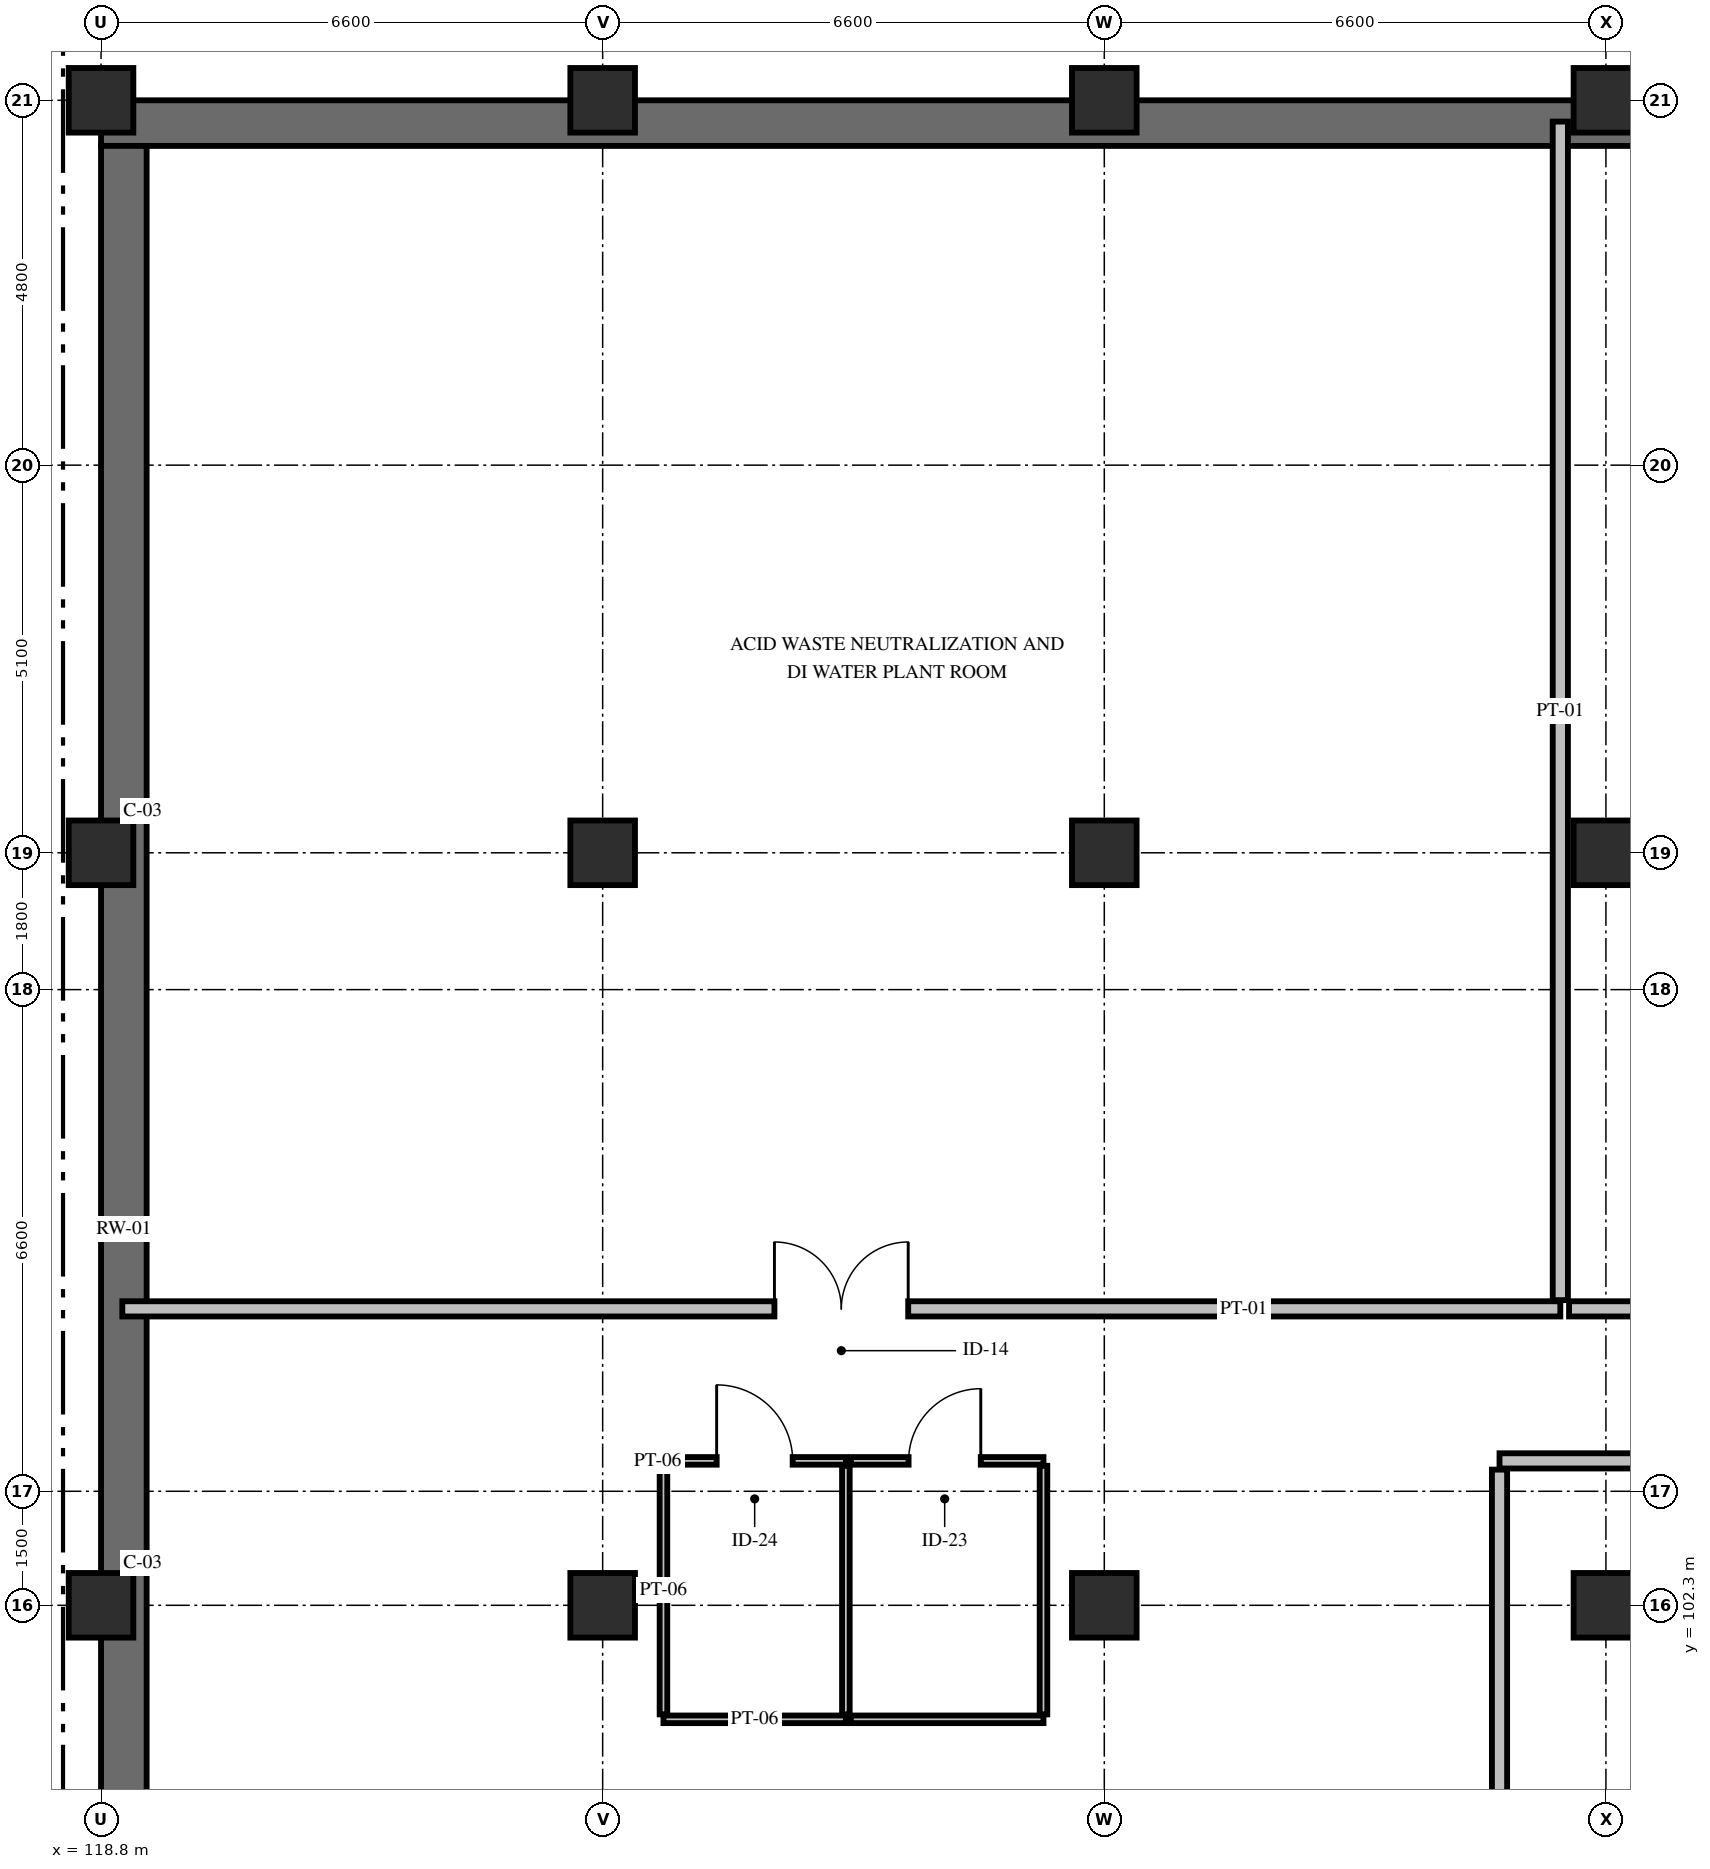
"""IFC4 building model, lengths in metres.
Left out: names, types, materials, properties, quantities, classifications, styles, units other than length and angle.
Written with IfcOpenShell. Run it as: python <this file> out.ifc"""

import sys

from ifc_helpers import new_model, si_unit, direction, frame, frame_2d, origin, origin_2d, place, context, subcontext, project, spatial, rectangle, extrude, element, fill, save


model = new_model("IFC4")
c1 = context("Model", 3, precision=1e-05, world=origin(), true_north=direction((0.0, 1.0)))
c2 = subcontext(c1, "Body", "Model", "MODEL_VIEW")
j1 = project(units=[si_unit("LENGTHUNIT", "METRE"), si_unit("PLANEANGLEUNIT", "RADIAN")], contexts=[c1])
p1 = place(None, origin())
s1 = spatial("IfcSite", under=j1, at=p1, CompositionType="ELEMENT")
p2 = place(p1, origin())
s2 = spatial("IfcBuilding", under=s1, at=p2, CompositionType="ELEMENT")
p3 = place(p2, frame((0.0, 0.0, -5.4)))
s3 = spatial("IfcBuildingStorey", under=s2, at=p3, CompositionType="ELEMENT", Elevation=-5.4)
p4 = place(p3, frame((118.8, 121.8, 0.0), z_axis=(0.0, 0.0, 1.0), x_axis=(1.0, 0.0, 0.0)))
e1 = element("IfcWall", 1, at=p4, inside=s3, PredefinedType="USERDEFINED", context=c2, shape_type="SweptSolid", body=[
    extrude(rectangle(XDim=59.4, YDim=0.6, at=frame_2d((29.7, 0.0))), origin(), (0.0, 0.0, 1.0), 4.96),
])
p5 = place(p3, frame((119.1, 93.0, 0.0), z_axis=(0.0, 0.0, 1.0), x_axis=(0.0, 1.0, 0.0)))
e2 = element("IfcWall", 2, at=p5, inside=s3, PredefinedType="USERDEFINED", context=c2, shape_type="SweptSolid", body=[
    extrude(rectangle(XDim=28.5, YDim=0.6, at=frame_2d((14.25, 0.0))), origin(), (0.0, 0.0, 1.0), 4.96),
])
for number, where, z_axis, x_axis in (
    (3, (118.8, 102.3, 0.0), (0.0, 0.0, 1.0), (1.0, 0.0, 0.0)),
    (4, (118.8, 112.2, 0.0), (0.0, 0.0, 1.0), (1.0, 0.0, 0.0)),
    (5, (118.8, 122.1, 0.0), (0.0, 0.0, 1.0), (1.0, 0.0, 0.0)),
    (6, (125.4, 102.3, 0.0), (0.0, 0.0, 1.0), (1.0, 0.0, 0.0)),
    (7, (125.4, 112.2, 0.0), (0.0, 0.0, 1.0), (1.0, 0.0, 0.0)),
    (8, (125.4, 122.1, 0.0), (0.0, 0.0, 1.0), (1.0, 0.0, 0.0)),
    (9, (132.0, 102.3, 0.0), (0.0, 0.0, 1.0), (1.0, 0.0, 0.0)),
    (10, (132.0, 112.2, 0.0), (0.0, 0.0, 1.0), (1.0, 0.0, 0.0)),
    (11, (132.0, 122.1, 0.0), (0.0, 0.0, 1.0), (1.0, 0.0, 0.0)),
    (12, (138.6, 102.3, 0.0), (0.0, 0.0, 1.0), (1.0, 0.0, 0.0)),
    (13, (138.6, 112.2, 0.0), (0.0, 0.0, 1.0), (1.0, 0.0, 0.0)),
    (14, (138.6, 122.1, 0.0), (0.0, 0.0, 1.0), (1.0, 0.0, 0.0)),
):
    element("IfcColumn", number, at=place(p3, frame(where, z_axis=z_axis, x_axis=x_axis)), inside=s3, PredefinedType="COLUMN", context=c2, shape_type="SweptSolid", body=[
        extrude(rectangle(XDim=0.85, YDim=0.85, at=origin_2d()), origin(), (0.0, 0.0, 1.0), 5.4),
    ])
p6 = place(p3, frame((126.2, 100.8, 0.0), z_axis=(0.0, 0.0, 1.0), x_axis=(1.0, 0.0, 0.0)))
e15 = element("IfcWall", 15, at=p6, inside=s3, PredefinedType="PARTITIONING", context=c2, shape_type="SweptSolid", body=[
    extrude(rectangle(XDim=2.4, YDim=0.1, at=frame_2d((1.2, 0.0))), origin(), (0.0, 0.0, 1.0), 4.94),
])
p7 = place(p3, frame((126.2, 104.2, 0.0), z_axis=(0.0, 0.0, 1.0), x_axis=(1.0, 0.0, 0.0)))
e16 = element("IfcWall", 16, at=p7, inside=s3, PredefinedType="PARTITIONING", context=c2, shape_type="SweptSolid", body=[
    extrude(rectangle(XDim=2.4, YDim=0.1, at=frame_2d((1.2, 0.0))), origin(), (0.0, 0.0, 1.0), 4.845),
])
p8 = place(p7, frame((0.7, 0.0, 0.0)))
e17 = element("IfcOpeningElement", 17, at=p8, cuts=e16, PredefinedType="OPENING", context=c2, shape_type="SweptSolid", body=[
    extrude(rectangle(XDim=1.0, YDim=2.15, at=frame_2d((0.5, 1.075))), frame((0.0, 0.065, 0.0), z_axis=(0.0, -1.0, 0.0), x_axis=(1.0, 0.0, 0.0)), (0.0, 0.0, 1.0), 0.13),
])
for number, where, z_axis, x_axis in (
    (18, (126.2, 100.865, 0.0), (0.0, 0.0, 1.0), (0.0, 1.0, 0.0)),
    (19, (128.6, 100.865, 0.0), (0.0, 0.0, 1.0), (0.0, 1.0, 0.0)),
):
    element("IfcWall", number, at=place(p3, frame(where, z_axis=z_axis, x_axis=x_axis)), inside=s3, PredefinedType="PARTITIONING", context=c2, shape_type="SweptSolid", body=[
        extrude(rectangle(XDim=3.27, YDim=0.1, at=frame_2d((1.635, 0.0))), origin(), (0.0, 0.0, 1.0), 4.665),
    ])
p9 = place(p3, frame((128.665, 100.8, 0.0), z_axis=(0.0, 0.0, 1.0), x_axis=(1.0, 0.0, 0.0)))
e20 = element("IfcWall", 20, at=p9, inside=s3, PredefinedType="PARTITIONING", context=c2, shape_type="SweptSolid", body=[
    extrude(rectangle(XDim=2.535, YDim=0.1, at=frame_2d((1.268, 0.0))), origin(), (0.0, 0.0, 1.0), 4.94),
])
p10 = place(p3, frame((128.665, 104.2, 0.0), z_axis=(0.0, 0.0, 1.0), x_axis=(1.0, 0.0, 0.0)))
e21 = element("IfcWall", 21, at=p10, inside=s3, PredefinedType="PARTITIONING", context=c2, shape_type="SweptSolid", body=[
    extrude(rectangle(XDim=2.535, YDim=0.1, at=frame_2d((1.268, 0.0))), origin(), (0.0, 0.0, 1.0), 4.845),
])
p11 = place(p10, frame((0.76, 0.0, 0.0)))
e22 = element("IfcOpeningElement", 22, at=p11, cuts=e21, PredefinedType="OPENING", context=c2, shape_type="SweptSolid", body=[
    extrude(rectangle(XDim=0.95, YDim=2.15, at=frame_2d((0.475, 1.075))), frame((0.0, 0.065, 0.0), z_axis=(0.0, -1.0, 0.0), x_axis=(1.0, 0.0, 0.0)), (0.0, 0.0, 1.0), 0.13),
])
p12 = place(p3, frame((131.2, 100.865, 0.0), z_axis=(0.0, 0.0, 1.0), x_axis=(0.0, 1.0, 0.0)))
e23 = element("IfcWall", 23, at=p12, inside=s3, PredefinedType="PARTITIONING", context=c2, shape_type="SweptSolid", body=[
    extrude(rectangle(XDim=3.27, YDim=0.1, at=frame_2d((1.635, 0.0))), origin(), (0.0, 0.0, 1.0), 4.665),
])
p13 = place(p3, frame((119.08, 106.2, 0.0), z_axis=(0.0, 0.0, 1.0), x_axis=(1.0, 0.0, 0.0)))
e24 = element("IfcWall", 24, at=p13, inside=s3, PredefinedType="PARTITIONING", context=c2, shape_type="SweptSolid", body=[
    extrude(rectangle(XDim=18.92, YDim=0.2, at=frame_2d((9.46, 0.0))), origin(), (0.0, 0.0, 1.0), 4.38),
])
p14 = place(p13, frame((8.58, 0.0, 0.0)))
e25 = element("IfcOpeningElement", 25, at=p14, cuts=e24, PredefinedType="OPENING", context=c2, shape_type="SweptSolid", body=[
    extrude(rectangle(XDim=1.76, YDim=2.35, at=frame_2d((0.88, 1.175))), frame((0.0, 0.115, 0.0), z_axis=(0.0, -1.0, 0.0), x_axis=(1.0, 0.0, 0.0)), (0.0, 0.0, 1.0), 0.23),
])
p15 = place(p3, frame((138.0, 106.315, 0.0), z_axis=(0.0, 0.0, 1.0), x_axis=(0.0, 1.0, 0.0)))
e26 = element("IfcWall", 26, at=p15, inside=s3, PredefinedType="PARTITIONING", context=c2, shape_type="SweptSolid", body=[
    extrude(rectangle(XDim=15.505, YDim=0.2, at=frame_2d((7.752, 0.0))), origin(), (0.0, 0.0, 1.0), 4.665),
])
p16 = place(p3, frame((138.115, 106.2, 0.0), z_axis=(0.0, 0.0, 1.0), x_axis=(1.0, 0.0, 0.0)))
e27 = element("IfcWall", 27, at=p16, inside=s3, PredefinedType="PARTITIONING", context=c2, shape_type="SweptSolid", body=[
    extrude(rectangle(XDim=25.485, YDim=0.2, at=frame_2d((12.743, 0.0))), origin(), (0.0, 0.0, 1.0), 4.38),
])
p17 = place(p16, frame((14.355, 0.0, 0.0)))
e28 = element("IfcOpeningElement", 28, at=p17, cuts=e27, PredefinedType="OPENING", context=c2, shape_type="SweptSolid", body=[
    extrude(rectangle(XDim=1.76, YDim=2.35, at=frame_2d((0.88, 1.175))), frame((0.0, 0.115, 0.0), z_axis=(0.0, -1.0, 0.0), x_axis=(1.0, 0.0, 0.0)), (0.0, 0.0, 1.0), 0.23),
])
p18 = place(p3, frame((137.2, 104.2, 0.0), z_axis=(0.0, 0.0, 1.0), x_axis=(1.0, 0.0, 0.0)))
e29 = element("IfcWall", 29, at=p18, inside=s3, PredefinedType="PARTITIONING", context=c2, shape_type="SweptSolid", body=[
    extrude(rectangle(XDim=11.2, YDim=0.2, at=frame_2d((5.6, 0.0))), origin(), (0.0, 0.0, 1.0), 4.38),
])
p19 = place(p18, frame((4.72, 0.0, 0.0)))
e30 = element("IfcOpeningElement", 30, at=p19, cuts=e29, PredefinedType="OPENING", context=c2, shape_type="SweptSolid", body=[
    extrude(rectangle(XDim=1.76, YDim=2.35, at=frame_2d((0.88, 1.175))), frame((0.0, 0.115, 0.0), z_axis=(0.0, -1.0, 0.0), x_axis=(1.0, 0.0, 0.0)), (0.0, 0.0, 1.0), 0.23),
])
p20 = place(p3, frame((137.2, 92.68, 0.0), z_axis=(0.0, 0.0, 1.0), x_axis=(0.0, 1.0, 0.0)))
e31 = element("IfcWall", 31, at=p20, inside=s3, PredefinedType="PARTITIONING", context=c2, shape_type="SweptSolid", body=[
    extrude(rectangle(XDim=11.405, YDim=0.2, at=frame_2d((5.703, 0.0))), origin(), (0.0, 0.0, 1.0), 4.665),
])
p21 = place(p8, origin())
e32 = element("IfcDoor", 32, at=p21, inside=s3, OperationType="SINGLE_SWING_LEFT", PredefinedType="DOOR", context=c2, shape_type="SweptSolid", body=[
    extrude(rectangle(XDim=1.0, YDim=2.15, at=frame_2d((0.5, 1.075))), frame((0.0, 0.025, 0.0), z_axis=(0.0, -1.0, 0.0), x_axis=(1.0, 0.0, 0.0)), (0.0, 0.0, 1.0), 0.05),
])
fill(e17, e32)
p22 = place(p11, origin())
e33 = element("IfcDoor", 33, at=p22, inside=s3, OperationType="SINGLE_SWING_RIGHT", PredefinedType="DOOR", context=c2, shape_type="SweptSolid", body=[
    extrude(rectangle(XDim=0.95, YDim=2.15, at=frame_2d((0.475, 1.075))), frame((0.0, 0.025, 0.0), z_axis=(0.0, -1.0, 0.0), x_axis=(1.0, 0.0, 0.0)), (0.0, 0.0, 1.0), 0.05),
])
fill(e22, e33)
p23 = place(p14, origin())
e34 = element("IfcDoor", 34, at=p23, inside=s3, OperationType="DOUBLE_DOOR_SINGLE_SWING", PredefinedType="DOOR", context=c2, shape_type="SweptSolid", body=[
    extrude(rectangle(XDim=1.76, YDim=2.35, at=frame_2d((0.88, 1.175))), frame((0.0, 0.025, 0.0), z_axis=(0.0, -1.0, 0.0), x_axis=(1.0, 0.0, 0.0)), (0.0, 0.0, 1.0), 0.05),
])
fill(e25, e34)
save(model, sys.argv[1])
